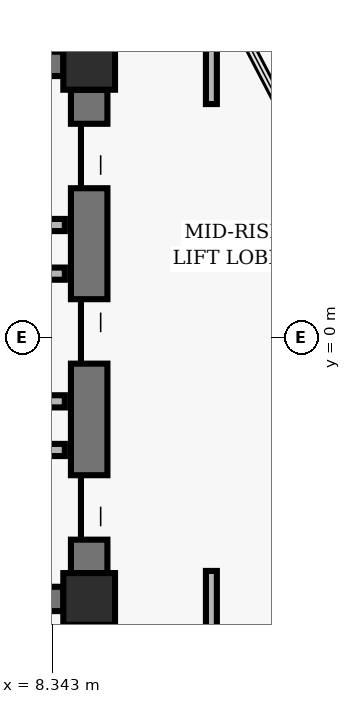
"""IFC4 building model, lengths in metres.
Left out: names, types, materials, properties, quantities, classifications, styles, units other than length and angle.
Written with IfcOpenShell. Run it as: python <this file> out.ifc"""

import sys

from ifc_helpers import new_model, si_unit, direction, frame, frame_2d, origin, origin_2d, place, context, subcontext, project, spatial, rectangle, hollow_rectangle, extrude, element, fill, save


model = new_model("IFC4")
c1 = context("Model", 3, precision=1e-05, world=origin(), true_north=direction((0.0, 1.0)))
c2 = subcontext(c1, "Body", "Model", "MODEL_VIEW")
j1 = project(units=[si_unit("LENGTHUNIT", "METRE"), si_unit("PLANEANGLEUNIT", "RADIAN")], contexts=[c1])
p1 = place(None, origin())
s1 = spatial("IfcSite", under=j1, at=p1, CompositionType="ELEMENT")
p2 = place(p1, origin())
s2 = spatial("IfcBuilding", under=s1, at=p2, CompositionType="ELEMENT")
p3 = place(p2, frame((0.0, 0.0, 138.08)))
s3 = spatial("IfcBuildingStorey", under=s2, at=p3, CompositionType="ELEMENT", Elevation=138.08)
for number, where, z_axis, x_axis in (
    (1, (8.95, 4.5, 0.0), (0.0, 0.0, 1.0), (1.0, 0.0, 0.0)),
    (2, (8.95, -4.3, 0.0), (0.0, 0.0, 1.0), (1.0, 0.0, 0.0)),
):
    element("IfcColumn", number, at=place(p3, frame(where, z_axis=z_axis, x_axis=x_axis)), inside=s3, PredefinedType="COLUMN", context=c2, shape_type="SweptSolid", body=[
        extrude(hollow_rectangle(XDim=0.85, YDim=0.85, WallThickness=0.055, InnerFilletRadius=0.02, OuterFilletRadius=0.04, at=origin_2d()), origin(), (0.0, 0.0, 1.0), 3.04),
    ])
p4 = place(p3, frame((8.95, -3.875, 0.0), z_axis=(0.0, 0.0, 1.0), x_axis=(0.0, 1.0, 0.0)))
e3 = element("IfcWall", 3, at=p4, inside=s3, PredefinedType="SHEAR", context=c2, shape_type="SweptSolid", body=[
    extrude(rectangle(XDim=7.95, YDim=0.6, at=frame_2d((3.975, 0.0))), origin(), (0.0, 0.0, 1.0), 2.788),
])
p5 = place(p4, frame((0.55, 0.0, 0.0)))
e4 = element("IfcOpeningElement", 4, at=p5, cuts=e3, PredefinedType="OPENING", context=c2, shape_type="SweptSolid", body=[
    extrude(rectangle(XDim=1.06, YDim=2.04, at=frame_2d((0.53, 1.02))), frame((0.0, 0.31, 0.0), z_axis=(0.0, -1.0, 0.0), x_axis=(1.0, 0.0, 0.0)), (0.0, 0.0, 1.0), 0.62),
])
p6 = place(p4, frame((3.445, 0.0, 0.0)))
e5 = element("IfcOpeningElement", 5, at=p6, cuts=e3, PredefinedType="OPENING", context=c2, shape_type="SweptSolid", body=[
    extrude(rectangle(XDim=1.06, YDim=2.04, at=frame_2d((0.53, 1.02))), frame((0.0, 0.31, 0.0), z_axis=(0.0, -1.0, 0.0), x_axis=(1.0, 0.0, 0.0)), (0.0, 0.0, 1.0), 0.62),
])
p7 = place(p4, frame((6.33, 0.0, 0.0)))
e6 = element("IfcOpeningElement", 6, at=p7, cuts=e3, PredefinedType="OPENING", context=c2, shape_type="SweptSolid", body=[
    extrude(rectangle(XDim=1.06, YDim=2.04, at=frame_2d((0.53, 1.02))), frame((0.0, 0.31, 0.0), z_axis=(0.0, -1.0, 0.0), x_axis=(1.0, 0.0, 0.0)), (0.0, 0.0, 1.0), 0.62),
])
for number, where, z_axis, x_axis in (
    (7, (6.475, 4.5, 0.0), (0.0, 0.0, 1.0), (1.0, 0.0, 0.0)),
    (8, (6.475, -4.3, 0.0), (0.0, 0.0, 1.0), (1.0, 0.0, 0.0)),
):
    element("IfcWall", number, at=place(p3, frame(where, z_axis=z_axis, x_axis=x_axis)), inside=s3, PredefinedType="SHEAR", context=c2, shape_type="SweptSolid", body=[
        extrude(rectangle(XDim=2.05, YDim=0.4, at=frame_2d((1.025, 0.0))), origin(), (0.0, 0.0, 1.0), 2.788),
    ])
for number, where, z_axis, x_axis in (
    (9, (6.45, -1.85, 0.0), (0.0, 0.0, 1.0), (1.0, 0.0, 0.0)),
    (10, (6.45, 1.85, 0.0), (0.0, 0.0, 1.0), (1.0, 0.0, 0.0)),
):
    element("IfcWall", number, at=place(p3, frame(where, z_axis=z_axis, x_axis=x_axis)), inside=s3, PredefinedType="PARTITIONING", context=c2, shape_type="SweptSolid", body=[
        extrude(rectangle(XDim=2.1, YDim=0.2, at=frame_2d((1.05, 0.0))), origin(), (0.0, 0.0, 1.0), 2.763),
    ])
for number, where, z_axis, x_axis in (
    (11, (6.64, -1.05, 0.0), (0.0, 0.0, 1.0), (1.0, 0.0, 0.0)),
    (12, (6.64, 1.05, 0.0), (0.0, 0.0, 1.0), (1.0, 0.0, 0.0)),
):
    element("IfcWall", number, at=place(p3, frame(where, z_axis=z_axis, x_axis=x_axis)), inside=s3, PredefinedType="PARTITIONING", context=c2, shape_type="SweptSolid", body=[
        extrude(rectangle(XDim=1.91, YDim=0.2, at=frame_2d((0.955, 0.0))), origin(), (0.0, 0.0, 1.0), 2.763),
    ])
p8 = place(p3, frame((10.003, 9.07, 0.0), z_axis=(0.0, 0.0, 1.0), x_axis=(0.461740291408, -0.887015165198, 0.0)))
e13 = element("IfcWall", 13, at=p8, inside=s3, PredefinedType="PARTITIONING", context=c2, shape_type="SweptSolid", body=[
    extrude(rectangle(XDim=9.976, YDim=0.18, at=frame_2d((4.988, 0.0))), origin(), (0.0, 0.0, 1.0), 2.763),
])
p9 = place(p8, frame((0.301, 0.0, 0.0)))
e14 = element("IfcOpeningElement", 14, at=p9, cuts=e13, PredefinedType="OPENING", context=c2, shape_type="SweptSolid", body=[
    extrude(rectangle(XDim=0.96, YDim=2.02, at=frame_2d((0.48, 1.01))), frame((0.0, 0.1, 0.0), z_axis=(0.0, -1.0, 0.0), x_axis=(1.0, 0.0, 0.0)), (0.0, 0.0, 1.0), 0.2),
])
for number, where, z_axis, x_axis in (
    (15, (10.96, -7.11, 0.0), (0.0, 0.0, 1.0), (0.0, 1.0, 0.0)),
    (16, (10.96, 3.84, 0.0), (0.0, 0.0, 1.0), (0.0, 1.0, 0.0)),
):
    element("IfcWall", number, at=place(p3, frame(where, z_axis=z_axis, x_axis=x_axis)), inside=s3, PredefinedType="PARTITIONING", context=c2, shape_type="SweptSolid", body=[
        extrude(rectangle(XDim=3.271, YDim=0.18, at=frame_2d((1.635, 0.0))), origin(), (0.0, 0.0, 1.0), 2.763),
    ])
p10 = place(p5, origin())
e17 = element("IfcDoor", 17, at=p10, inside=s3, OperationType="SLIDING_TO_LEFT", PredefinedType="DOOR", context=c2, shape_type="SweptSolid", body=[
    extrude(rectangle(XDim=1.06, YDim=2.04, at=frame_2d((0.53, 1.02))), frame((0.0, 0.025, 0.0), z_axis=(0.0, -1.0, 0.0), x_axis=(1.0, 0.0, 0.0)), (0.0, 0.0, 1.0), 0.05),
])
fill(e4, e17)
p11 = place(p6, origin())
e18 = element("IfcDoor", 18, at=p11, inside=s3, OperationType="SLIDING_TO_RIGHT", PredefinedType="DOOR", context=c2, shape_type="SweptSolid", body=[
    extrude(rectangle(XDim=1.06, YDim=2.04, at=frame_2d((0.53, 1.02))), frame((0.0, 0.025, 0.0), z_axis=(0.0, -1.0, 0.0), x_axis=(1.0, 0.0, 0.0)), (0.0, 0.0, 1.0), 0.05),
])
fill(e5, e18)
p12 = place(p7, origin())
e19 = element("IfcDoor", 19, at=p12, inside=s3, OperationType="SLIDING_TO_LEFT", PredefinedType="DOOR", context=c2, shape_type="SweptSolid", body=[
    extrude(rectangle(XDim=1.06, YDim=2.04, at=frame_2d((0.53, 1.02))), frame((0.0, 0.025, 0.0), z_axis=(0.0, -1.0, 0.0), x_axis=(1.0, 0.0, 0.0)), (0.0, 0.0, 1.0), 0.05),
])
fill(e6, e19)
save(model, sys.argv[1])
